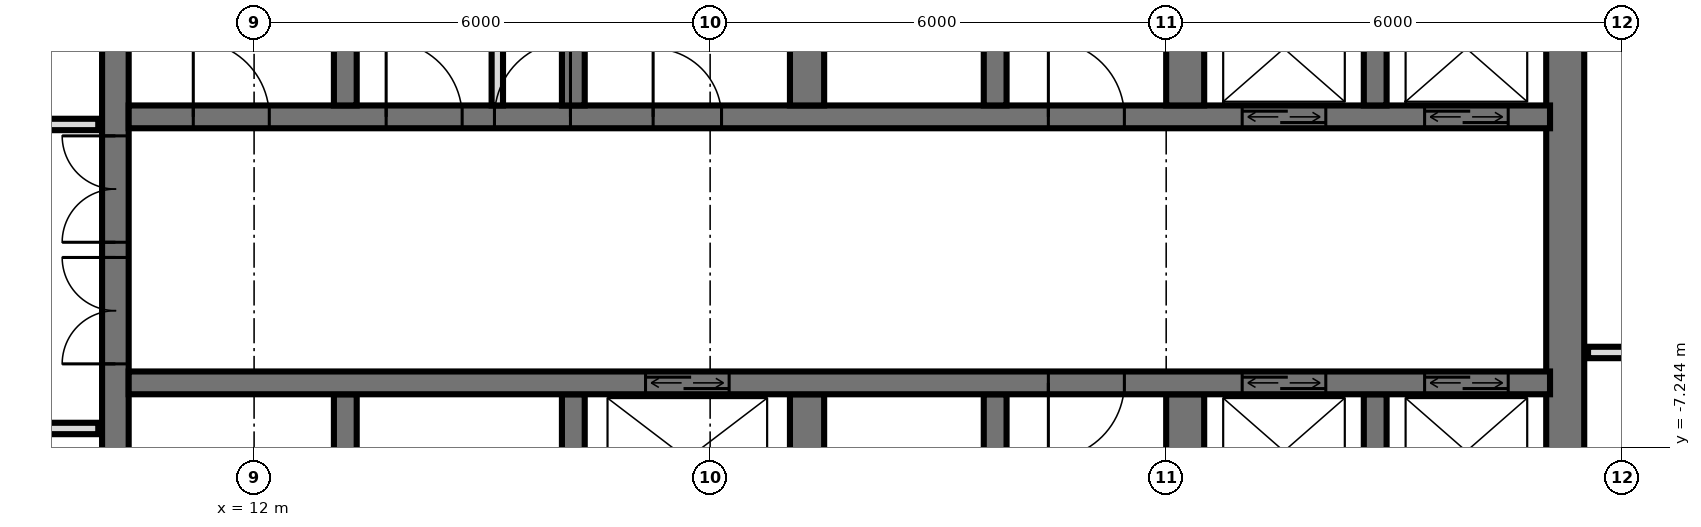
"""IFC4 building model, lengths in metres.
Left out: names, types, materials, properties, quantities, classifications, styles, units other than length and angle.
Written with IfcOpenShell. Run it as: python <this file> out.ifc"""

import sys

from ifc_helpers import new_model, si_unit, direction, frame, frame_2d, origin, place, context, subcontext, project, spatial, rectangle, extrude, element, fill, save


model = new_model("IFC4")
c1 = context("Model", 3, precision=1e-05, world=origin(), true_north=direction((0.0, 1.0)))
c2 = subcontext(c1, "Body", "Model", "MODEL_VIEW")
j1 = project(units=[si_unit("LENGTHUNIT", "METRE"), si_unit("PLANEANGLEUNIT", "RADIAN")], contexts=[c1])
p1 = place(None, origin())
s1 = spatial("IfcSite", under=j1, at=p1, CompositionType="ELEMENT")
p2 = place(p1, origin())
s2 = spatial("IfcBuilding", under=s1, at=p2, CompositionType="ELEMENT")
p3 = place(p2, frame((0.0, 0.0, 49.2)))
s3 = spatial("IfcBuildingStorey", under=s2, at=p3, CompositionType="ELEMENT", Elevation=49.2)
p4 = place(p3, frame((10.175, -14.55, 0.0), z_axis=(0.0, 0.0, 1.0), x_axis=(0.0, 1.0, 0.0)))
e1 = element("IfcWall", 1, at=p4, inside=s3, PredefinedType="SHEAR", context=c2, shape_type="SweptSolid", body=[
    extrude(rectangle(XDim=14.1, YDim=0.35, at=frame_2d((7.05, 0.0))), origin(), (0.0, 0.0, 1.0), 3.6),
])
p5 = place(p4, frame((8.4, 0.0, 0.0)))
e2 = element("IfcOpeningElement", 2, at=p5, cuts=e1, PredefinedType="OPENING", context=c2, shape_type="SweptSolid", body=[
    extrude(rectangle(XDim=1.4, YDim=2.4, at=frame_2d((0.7, 1.2))), frame((0.0, 0.185, 0.0), z_axis=(0.0, -1.0, 0.0), x_axis=(1.0, 0.0, 0.0)), (0.0, 0.0, 1.0), 0.37),
])
p6 = place(p4, frame((10.0, 0.0, 0.0)))
e3 = element("IfcOpeningElement", 3, at=p6, cuts=e1, PredefinedType="OPENING", context=c2, shape_type="SweptSolid", body=[
    extrude(rectangle(XDim=1.4, YDim=2.4, at=frame_2d((0.7, 1.2))), frame((0.0, 0.185, 0.0), z_axis=(0.0, -1.0, 0.0), x_axis=(1.0, 0.0, 0.0)), (0.0, 0.0, 1.0), 0.37),
])
p7 = place(p4, frame((4.0, 0.0, 0.0)))
e4 = element("IfcOpeningElement", 4, at=p7, cuts=e1, PredefinedType="OPENING", context=c2, shape_type="SweptSolid", body=[
    extrude(rectangle(XDim=1.2, YDim=2.1, at=frame_2d((0.6, 1.05))), frame((0.0, 0.185, 0.0), z_axis=(0.0, -1.0, 0.0), x_axis=(1.0, 0.0, 0.0)), (0.0, 0.0, 1.0), 0.37),
])
p8 = place(p3, frame((29.25, -14.55, 0.0), z_axis=(0.0, 0.0, 1.0), x_axis=(0.0, 1.0, 0.0)))
e5 = element("IfcWall", 5, at=p8, inside=s3, PredefinedType="SHEAR", context=c2, shape_type="SweptSolid", body=[
    extrude(rectangle(XDim=14.1, YDim=0.5, at=frame_2d((7.05, 0.0))), origin(), (0.0, 0.0, 1.0), 3.6),
])
p9 = place(p3, frame((10.35, -2.9, 0.0), z_axis=(0.0, 0.0, 1.0), x_axis=(1.0, 0.0, 0.0)))
e6 = element("IfcWall", 6, at=p9, inside=s3, PredefinedType="SHEAR", context=c2, shape_type="SweptSolid", body=[
    extrude(rectangle(XDim=18.7, YDim=0.3, at=frame_2d((9.35, 0.0))), origin(), (0.0, 0.0, 1.0), 3.6),
])
p10 = place(p9, frame((14.65, 0.0, 0.0)))
e7 = element("IfcOpeningElement", 7, at=p10, cuts=e6, PredefinedType="OPENING", context=c2, shape_type="SweptSolid", body=[
    extrude(rectangle(XDim=1.1, YDim=2.1, at=frame_2d((0.55, 1.05))), frame((0.0, 0.16, 0.0), z_axis=(0.0, -1.0, 0.0), x_axis=(1.0, 0.0, 0.0)), (0.0, 0.0, 1.0), 0.32),
])
p11 = place(p9, frame((17.05, 0.0, 0.0)))
e8 = element("IfcOpeningElement", 8, at=p11, cuts=e6, PredefinedType="OPENING", context=c2, shape_type="SweptSolid", body=[
    extrude(rectangle(XDim=1.1, YDim=2.1, at=frame_2d((0.55, 1.05))), frame((0.0, 0.16, 0.0), z_axis=(0.0, -1.0, 0.0), x_axis=(1.0, 0.0, 0.0)), (0.0, 0.0, 1.0), 0.32),
])
p12 = place(p9, frame((6.9, 0.0, 0.0)))
e9 = element("IfcOpeningElement", 9, at=p12, cuts=e6, PredefinedType="OPENING", context=c2, shape_type="SweptSolid", body=[
    extrude(rectangle(XDim=0.9, YDim=2.1, at=frame_2d((0.45, 1.05))), frame((0.0, 0.16, 0.0), z_axis=(0.0, -1.0, 0.0), x_axis=(1.0, 0.0, 0.0)), (0.0, 0.0, 1.0), 0.32),
])
p13 = place(p9, frame((0.85, 0.0, 0.0)))
e10 = element("IfcOpeningElement", 10, at=p13, cuts=e6, PredefinedType="OPENING", context=c2, shape_type="SweptSolid", body=[
    extrude(rectangle(XDim=1.0, YDim=2.1, at=frame_2d((0.5, 1.05))), frame((0.0, 0.16, 0.0), z_axis=(0.0, -1.0, 0.0), x_axis=(1.0, 0.0, 0.0)), (0.0, 0.0, 1.0), 0.32),
])
p14 = place(p9, frame((3.387, 0.0, 0.0)))
e11 = element("IfcOpeningElement", 11, at=p14, cuts=e6, PredefinedType="OPENING", context=c2, shape_type="SweptSolid", body=[
    extrude(rectangle(XDim=1.0, YDim=2.1, at=frame_2d((0.5, 1.05))), frame((0.0, 0.16, 0.0), z_axis=(0.0, -1.0, 0.0), x_axis=(1.0, 0.0, 0.0)), (0.0, 0.0, 1.0), 0.32),
])
p15 = place(p9, frame((4.812, 0.0, 0.0)))
e12 = element("IfcOpeningElement", 12, at=p15, cuts=e6, PredefinedType="OPENING", context=c2, shape_type="SweptSolid", body=[
    extrude(rectangle(XDim=1.0, YDim=2.1, at=frame_2d((0.5, 1.05))), frame((0.0, 0.16, 0.0), z_axis=(0.0, -1.0, 0.0), x_axis=(1.0, 0.0, 0.0)), (0.0, 0.0, 1.0), 0.32),
])
p16 = place(p9, frame((12.1, 0.0, 0.0)))
e13 = element("IfcOpeningElement", 13, at=p16, cuts=e6, PredefinedType="OPENING", context=c2, shape_type="SweptSolid", body=[
    extrude(rectangle(XDim=1.0, YDim=2.1, at=frame_2d((0.5, 1.05))), frame((0.0, 0.16, 0.0), z_axis=(0.0, -1.0, 0.0), x_axis=(1.0, 0.0, 0.0)), (0.0, 0.0, 1.0), 0.32),
])
p17 = place(p3, frame((10.35, -6.4, 0.0), z_axis=(0.0, 0.0, 1.0), x_axis=(1.0, 0.0, 0.0)))
e14 = element("IfcWall", 14, at=p17, inside=s3, PredefinedType="SHEAR", context=c2, shape_type="SweptSolid", body=[
    extrude(rectangle(XDim=18.7, YDim=0.3, at=frame_2d((9.35, 0.0))), origin(), (0.0, 0.0, 1.0), 3.6),
])
p18 = place(p17, frame((14.65, 0.0, 0.0)))
e15 = element("IfcOpeningElement", 15, at=p18, cuts=e14, PredefinedType="OPENING", context=c2, shape_type="SweptSolid", body=[
    extrude(rectangle(XDim=1.1, YDim=2.1, at=frame_2d((0.55, 1.05))), frame((0.0, 0.16, 0.0), z_axis=(0.0, -1.0, 0.0), x_axis=(1.0, 0.0, 0.0)), (0.0, 0.0, 1.0), 0.32),
])
p19 = place(p17, frame((17.05, 0.0, 0.0)))
e16 = element("IfcOpeningElement", 16, at=p19, cuts=e14, PredefinedType="OPENING", context=c2, shape_type="SweptSolid", body=[
    extrude(rectangle(XDim=1.1, YDim=2.1, at=frame_2d((0.55, 1.05))), frame((0.0, 0.16, 0.0), z_axis=(0.0, -1.0, 0.0), x_axis=(1.0, 0.0, 0.0)), (0.0, 0.0, 1.0), 0.32),
])
p20 = place(p17, frame((6.8, 0.0, 0.0)))
e17 = element("IfcOpeningElement", 17, at=p20, cuts=e14, PredefinedType="OPENING", context=c2, shape_type="SweptSolid", body=[
    extrude(rectangle(XDim=1.1, YDim=2.1, at=frame_2d((0.55, 1.05))), frame((0.0, 0.16, 0.0), z_axis=(0.0, -1.0, 0.0), x_axis=(1.0, 0.0, 0.0)), (0.0, 0.0, 1.0), 0.32),
])
p21 = place(p17, frame((12.1, 0.0, 0.0)))
e18 = element("IfcOpeningElement", 18, at=p21, cuts=e14, PredefinedType="OPENING", context=c2, shape_type="SweptSolid", body=[
    extrude(rectangle(XDim=1.0, YDim=2.1, at=frame_2d((0.5, 1.05))), frame((0.0, 0.16, 0.0), z_axis=(0.0, -1.0, 0.0), x_axis=(1.0, 0.0, 0.0)), (0.0, 0.0, 1.0), 0.32),
])
for number, where, z_axis, x_axis in (
    (19, (13.2, -2.75, 0.0), (0.0, 0.0, 1.0), (0.0, 1.0, 0.0)),
    (20, (13.2, -8.85, 0.0), (0.0, 0.0, 1.0), (0.0, 1.0, 0.0)),
    (21, (16.2, -2.75, 0.0), (0.0, 0.0, 1.0), (0.0, 1.0, 0.0)),
    (22, (16.2, -8.85, 0.0), (0.0, 0.0, 1.0), (0.0, 1.0, 0.0)),
):
    element("IfcWall", number, at=place(p3, frame(where, z_axis=z_axis, x_axis=x_axis)), inside=s3, PredefinedType="SHEAR", context=c2, shape_type="SweptSolid", body=[
        extrude(rectangle(XDim=2.3, YDim=0.3, at=frame_2d((1.15, 0.0))), origin(), (0.0, 0.0, 1.0), 3.6),
    ])
for number, where, z_axis, x_axis in (
    (23, (19.275, -2.75, 0.0), (0.0, 0.0, 1.0), (0.0, 1.0, 0.0)),
    (24, (19.275, -8.85, 0.0), (0.0, 0.0, 1.0), (0.0, 1.0, 0.0)),
):
    element("IfcWall", number, at=place(p3, frame(where, z_axis=z_axis, x_axis=x_axis)), inside=s3, PredefinedType="SHEAR", context=c2, shape_type="SweptSolid", body=[
        extrude(rectangle(XDim=2.3, YDim=0.45, at=frame_2d((1.15, 0.0))), origin(), (0.0, 0.0, 1.0), 3.6),
    ])
for number, where, z_axis, x_axis in (
    (25, (21.75, -2.75, 0.0), (0.0, 0.0, 1.0), (0.0, 1.0, 0.0)),
    (26, (21.75, -8.85, 0.0), (0.0, 0.0, 1.0), (0.0, 1.0, 0.0)),
):
    element("IfcWall", number, at=place(p3, frame(where, z_axis=z_axis, x_axis=x_axis)), inside=s3, PredefinedType="SHEAR", context=c2, shape_type="SweptSolid", body=[
        extrude(rectangle(XDim=2.3, YDim=0.3, at=frame_2d((1.15, 0.0))), origin(), (0.0, 0.0, 1.0), 3.6),
    ])
for number, where, z_axis, x_axis in (
    (27, (24.25, -2.75, 0.0), (0.0, 0.0, 1.0), (0.0, 1.0, 0.0)),
    (28, (24.25, -8.85, 0.0), (0.0, 0.0, 1.0), (0.0, 1.0, 0.0)),
):
    element("IfcWall", number, at=place(p3, frame(where, z_axis=z_axis, x_axis=x_axis)), inside=s3, PredefinedType="SHEAR", context=c2, shape_type="SweptSolid", body=[
        extrude(rectangle(XDim=2.3, YDim=0.5, at=frame_2d((1.15, 0.0))), origin(), (0.0, 0.0, 1.0), 3.6),
    ])
for number, where, z_axis, x_axis in (
    (29, (26.75, -2.75, 0.0), (0.0, 0.0, 1.0), (0.0, 1.0, 0.0)),
    (30, (26.75, -8.85, 0.0), (0.0, 0.0, 1.0), (0.0, 1.0, 0.0)),
):
    element("IfcWall", number, at=place(p3, frame(where, z_axis=z_axis, x_axis=x_axis)), inside=s3, PredefinedType="SHEAR", context=c2, shape_type="SweptSolid", body=[
        extrude(rectangle(XDim=2.3, YDim=0.3, at=frame_2d((1.15, 0.0))), origin(), (0.0, 0.0, 1.0), 3.6),
    ])
p22 = place(p3, frame((15.2, -2.75, 0.0), z_axis=(0.0, 0.0, 1.0), x_axis=(0.0, 1.0, 0.0)))
e31 = element("IfcWall", 31, at=p22, inside=s3, PredefinedType="PARTITIONING", context=c2, shape_type="SweptSolid", body=[
    extrude(rectangle(XDim=2.3, YDim=0.15, at=frame_2d((1.15, 0.0))), origin(), (0.0, 0.0, 1.0), 3.3),
])
p23 = place(p3, frame((-9.95, -7.0, 0.0), z_axis=(0.0, 0.0, 1.0), x_axis=(1.0, 0.0, 0.0)))
e32 = element("IfcWall", 32, at=p23, inside=s3, PredefinedType="PARTITIONING", context=c2, shape_type="SweptSolid", body=[
    extrude(rectangle(XDim=19.9, YDim=0.15, at=frame_2d((9.95, 0.0))), origin(), (0.0, 0.0, 1.0), 3.32),
])
p24 = place(p23, frame((9.45, 0.0, 0.0)))
e33 = element("IfcOpeningElement", 33, at=p24, cuts=e32, PredefinedType="OPENING", context=c2, shape_type="SweptSolid", body=[
    extrude(rectangle(XDim=1.0, YDim=2.1, at=frame_2d((0.5, 1.05))), frame((0.0, 0.085, 0.0), z_axis=(0.0, -1.0, 0.0), x_axis=(1.0, 0.0, 0.0)), (0.0, 0.0, 1.0), 0.17),
])
p25 = place(p23, frame((3.45, 0.0, 0.0)))
e34 = element("IfcOpeningElement", 34, at=p25, cuts=e32, PredefinedType="OPENING", context=c2, shape_type="SweptSolid", body=[
    extrude(rectangle(XDim=1.0, YDim=2.1, at=frame_2d((0.5, 1.05))), frame((0.0, 0.085, 0.0), z_axis=(0.0, -1.0, 0.0), x_axis=(1.0, 0.0, 0.0)), (0.0, 0.0, 1.0), 0.17),
])
p26 = place(p3, frame((29.55, -6.0, 0.0), z_axis=(0.0, 0.0, 1.0), x_axis=(1.0, 0.0, 0.0)))
e35 = element("IfcWall", 35, at=p26, inside=s3, PredefinedType="PARTITIONING", context=c2, shape_type="SweptSolid", body=[
    extrude(rectangle(XDim=3.57, YDim=0.15, at=frame_2d((1.785, 0.0))), origin(), (0.0, 0.0, 1.0), 3.32),
])
p27 = place(p26, frame((1.4, 0.0, 0.0)))
e36 = element("IfcOpeningElement", 36, at=p27, cuts=e35, PredefinedType="OPENING", context=c2, shape_type="SweptSolid", body=[
    extrude(rectangle(XDim=0.9, YDim=2.1, at=frame_2d((0.45, 1.05))), frame((0.0, 0.085, 0.0), z_axis=(0.0, -1.0, 0.0), x_axis=(1.0, 0.0, 0.0)), (0.0, 0.0, 1.0), 0.17),
])
p28 = place(p3, frame((-9.95, -3.0, 0.0), z_axis=(0.0, 0.0, 1.0), x_axis=(1.0, 0.0, 0.0)))
e37 = element("IfcWall", 37, at=p28, inside=s3, PredefinedType="PARTITIONING", context=c2, shape_type="SweptSolid", body=[
    extrude(rectangle(XDim=19.9, YDim=0.15, at=frame_2d((9.95, 0.0))), origin(), (0.0, 0.0, 1.0), 3.32),
])
p29 = place(p28, frame((4.2, 0.0, 0.0)))
e38 = element("IfcOpeningElement", 38, at=p29, cuts=e37, PredefinedType="OPENING", context=c2, shape_type="SweptSolid", body=[
    extrude(rectangle(XDim=1.0, YDim=2.1, at=frame_2d((0.5, 1.05))), frame((0.0, 0.085, 0.0), z_axis=(0.0, -1.0, 0.0), x_axis=(1.0, 0.0, 0.0)), (0.0, 0.0, 1.0), 0.17),
])
p30 = place(p28, frame((11.45, 0.0, 0.0)))
e39 = element("IfcOpeningElement", 39, at=p30, cuts=e37, PredefinedType="OPENING", context=c2, shape_type="SweptSolid", body=[
    extrude(rectangle(XDim=1.0, YDim=2.1, at=frame_2d((0.5, 1.05))), frame((0.0, 0.085, 0.0), z_axis=(0.0, -1.0, 0.0), x_axis=(1.0, 0.0, 0.0)), (0.0, 0.0, 1.0), 0.17),
])
p31 = place(p28, frame((15.45, 0.0, 0.0)))
e40 = element("IfcOpeningElement", 40, at=p31, cuts=e37, PredefinedType="OPENING", context=c2, shape_type="SweptSolid", body=[
    extrude(rectangle(XDim=1.0, YDim=2.1, at=frame_2d((0.5, 1.05))), frame((0.0, 0.085, 0.0), z_axis=(0.0, -1.0, 0.0), x_axis=(1.0, 0.0, 0.0)), (0.0, 0.0, 1.0), 0.17),
])
p32 = place(p28, frame((18.2, 0.0, 0.0)))
e41 = element("IfcOpeningElement", 41, at=p32, cuts=e37, PredefinedType="OPENING", context=c2, shape_type="SweptSolid", body=[
    extrude(rectangle(XDim=1.0, YDim=2.1, at=frame_2d((0.5, 1.05))), frame((0.0, 0.085, 0.0), z_axis=(0.0, -1.0, 0.0), x_axis=(1.0, 0.0, 0.0)), (0.0, 0.0, 1.0), 0.17),
])
p33 = place(p10, origin())
e42 = element("IfcDoor", 42, at=p33, inside=s3, OperationType="DOUBLE_DOOR_SLIDING", PredefinedType="USERDEFINED", context=c2, shape_type="SweptSolid", body=[
    extrude(rectangle(XDim=1.1, YDim=2.1, at=frame_2d((0.55, 1.05))), frame((0.0, 0.025, 0.0), z_axis=(0.0, -1.0, 0.0), x_axis=(1.0, 0.0, 0.0)), (0.0, 0.0, 1.0), 0.05),
])
fill(e7, e42)
p34 = place(p11, origin())
e43 = element("IfcDoor", 43, at=p34, inside=s3, OperationType="DOUBLE_DOOR_SLIDING", PredefinedType="USERDEFINED", context=c2, shape_type="SweptSolid", body=[
    extrude(rectangle(XDim=1.1, YDim=2.1, at=frame_2d((0.55, 1.05))), frame((0.0, 0.025, 0.0), z_axis=(0.0, -1.0, 0.0), x_axis=(1.0, 0.0, 0.0)), (0.0, 0.0, 1.0), 0.05),
])
fill(e8, e43)
p35 = place(p18, origin())
e44 = element("IfcDoor", 44, at=p35, inside=s3, OperationType="DOUBLE_DOOR_SLIDING", PredefinedType="USERDEFINED", context=c2, shape_type="SweptSolid", body=[
    extrude(rectangle(XDim=1.1, YDim=2.1, at=frame_2d((0.55, 1.05))), frame((0.0, 0.025, 0.0), z_axis=(0.0, -1.0, 0.0), x_axis=(1.0, 0.0, 0.0)), (0.0, 0.0, 1.0), 0.05),
])
fill(e15, e44)
p36 = place(p19, origin())
e45 = element("IfcDoor", 45, at=p36, inside=s3, OperationType="DOUBLE_DOOR_SLIDING", PredefinedType="USERDEFINED", context=c2, shape_type="SweptSolid", body=[
    extrude(rectangle(XDim=1.1, YDim=2.1, at=frame_2d((0.55, 1.05))), frame((0.0, 0.025, 0.0), z_axis=(0.0, -1.0, 0.0), x_axis=(1.0, 0.0, 0.0)), (0.0, 0.0, 1.0), 0.05),
])
fill(e16, e45)
p37 = place(p20, origin())
e46 = element("IfcDoor", 46, at=p37, inside=s3, OperationType="DOUBLE_DOOR_SLIDING", PredefinedType="USERDEFINED", context=c2, shape_type="SweptSolid", body=[
    extrude(rectangle(XDim=1.1, YDim=2.1, at=frame_2d((0.55, 1.05))), frame((0.0, 0.025, 0.0), z_axis=(0.0, -1.0, 0.0), x_axis=(1.0, 0.0, 0.0)), (0.0, 0.0, 1.0), 0.05),
])
fill(e17, e46)
p38 = place(p5, origin())
e47 = element("IfcDoor", 47, at=p38, inside=s3, OperationType="DOUBLE_DOOR_SINGLE_SWING", PredefinedType="DOOR", context=c2, shape_type="SweptSolid", body=[
    extrude(rectangle(XDim=1.4, YDim=2.4, at=frame_2d((0.7, 1.2))), frame((0.0, 0.025, 0.0), z_axis=(0.0, -1.0, 0.0), x_axis=(1.0, 0.0, 0.0)), (0.0, 0.0, 1.0), 0.05),
])
fill(e2, e47)
p39 = place(p6, origin())
e48 = element("IfcDoor", 48, at=p39, inside=s3, OperationType="DOUBLE_DOOR_SINGLE_SWING", PredefinedType="DOOR", context=c2, shape_type="SweptSolid", body=[
    extrude(rectangle(XDim=1.4, YDim=2.4, at=frame_2d((0.7, 1.2))), frame((0.0, 0.025, 0.0), z_axis=(0.0, -1.0, 0.0), x_axis=(1.0, 0.0, 0.0)), (0.0, 0.0, 1.0), 0.05),
])
fill(e3, e48)
p40 = place(p12, origin())
e49 = element("IfcDoor", 49, at=p40, inside=s3, OperationType="SINGLE_SWING_RIGHT", PredefinedType="DOOR", context=c2, shape_type="SweptSolid", body=[
    extrude(rectangle(XDim=0.9, YDim=2.1, at=frame_2d((0.45, 1.05))), frame((0.0, 0.025, 0.0), z_axis=(0.0, -1.0, 0.0), x_axis=(1.0, 0.0, 0.0)), (0.0, 0.0, 1.0), 0.05),
])
fill(e9, e49)
p41 = place(p13, origin())
e50 = element("IfcDoor", 50, at=p41, inside=s3, OperationType="SINGLE_SWING_RIGHT", PredefinedType="DOOR", context=c2, shape_type="SweptSolid", body=[
    extrude(rectangle(XDim=1.0, YDim=2.1, at=frame_2d((0.5, 1.05))), frame((0.0, 0.025, 0.0), z_axis=(0.0, -1.0, 0.0), x_axis=(1.0, 0.0, 0.0)), (0.0, 0.0, 1.0), 0.05),
])
fill(e10, e50)
p42 = place(p14, origin())
e51 = element("IfcDoor", 51, at=p42, inside=s3, OperationType="SINGLE_SWING_RIGHT", PredefinedType="DOOR", context=c2, shape_type="SweptSolid", body=[
    extrude(rectangle(XDim=1.0, YDim=2.1, at=frame_2d((0.5, 1.05))), frame((0.0, 0.025, 0.0), z_axis=(0.0, -1.0, 0.0), x_axis=(1.0, 0.0, 0.0)), (0.0, 0.0, 1.0), 0.05),
])
fill(e11, e51)
p43 = place(p15, origin())
e52 = element("IfcDoor", 52, at=p43, inside=s3, OperationType="SINGLE_SWING_LEFT", PredefinedType="DOOR", context=c2, shape_type="SweptSolid", body=[
    extrude(rectangle(XDim=1.0, YDim=2.1, at=frame_2d((0.5, 1.05))), frame((0.0, 0.025, 0.0), z_axis=(0.0, -1.0, 0.0), x_axis=(1.0, 0.0, 0.0)), (0.0, 0.0, 1.0), 0.05),
])
fill(e12, e52)
p44 = place(p16, origin())
e53 = element("IfcDoor", 53, at=p44, inside=s3, OperationType="SINGLE_SWING_RIGHT", PredefinedType="DOOR", context=c2, shape_type="SweptSolid", body=[
    extrude(rectangle(XDim=1.0, YDim=2.1, at=frame_2d((0.5, 1.05))), frame((0.0, 0.025, 0.0), z_axis=(0.0, -1.0, 0.0), x_axis=(1.0, 0.0, 0.0)), (0.0, 0.0, 1.0), 0.05),
])
fill(e13, e53)
p45 = place(p21, frame((0.5, 0.0, 0.0), z_axis=(0.0, 0.0, 1.0), x_axis=(-1.0, 0.0, 0.0)))
e54 = element("IfcDoor", 54, at=p45, inside=s3, OperationType="SINGLE_SWING_LEFT", PredefinedType="DOOR", context=c2, shape_type="SweptSolid", body=[
    extrude(rectangle(XDim=1.0, YDim=2.1, at=frame_2d((0.0, 1.05))), frame((0.0, -0.025, 0.0), z_axis=(0.0, 1.0, 0.0), x_axis=(-1.0, 0.0, 0.0)), (0.0, 0.0, 1.0), 0.05),
])
fill(e18, e54)
save(model, sys.argv[1])
